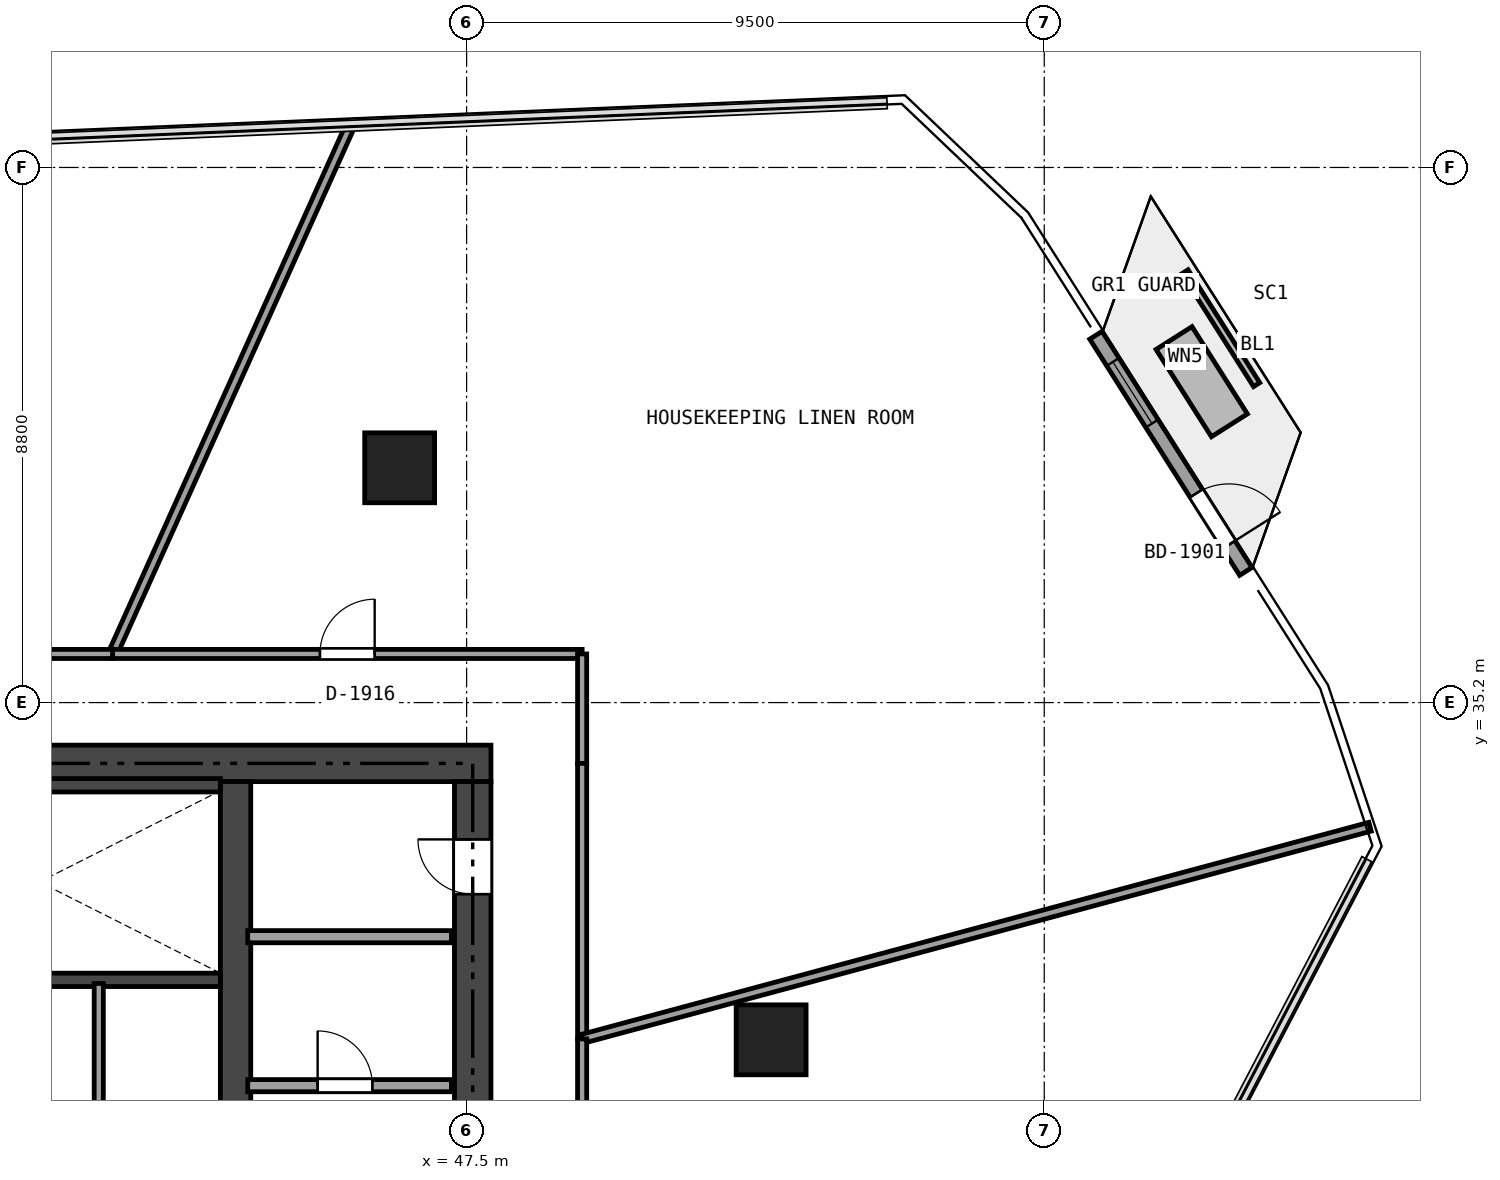
"""IFC4 building model, lengths in metres.
Left out: names, types, materials, properties, quantities, classifications, styles, units other than length and angle.
Written with IfcOpenShell. Run it as: python <this file> out.ifc"""

import sys

from ifc_helpers import new_model, si_unit, direction, frame, frame_2d, origin, origin_2d, place, context, subcontext, project, spatial, rectangle, extrude, element, fill, save


model = new_model("IFC4")
c1 = context("Model", 3, precision=1e-05, world=origin(), true_north=direction((0.0, 1.0)))
c2 = subcontext(c1, "Body", "Model", "MODEL_VIEW")
j1 = project(units=[si_unit("LENGTHUNIT", "METRE"), si_unit("PLANEANGLEUNIT", "RADIAN")], contexts=[c1])
p1 = place(None, origin())
s1 = spatial("IfcSite", under=j1, at=p1, CompositionType="ELEMENT")
p2 = place(p1, origin())
s2 = spatial("IfcBuilding", under=s1, at=p2, CompositionType="ELEMENT")
p3 = place(p2, frame((0.0, 0.0, 76.35)))
s3 = spatial("IfcBuildingStorey", under=s2, at=p3, CompositionType="ELEMENT", Elevation=76.35)
p4 = place(p3, frame((26.5, 34.2, 0.0), z_axis=(0.0, 0.0, 1.0), x_axis=(1.0, 0.0, 0.0)))
e1 = element("IfcWall", 1, at=p4, inside=s3, PredefinedType="SHEAR", context=c2, shape_type="SweptSolid", body=[
    extrude(rectangle(XDim=21.4, YDim=0.6, at=frame_2d((10.7, 0.0))), origin(), (0.0, 0.0, 1.0), 3.17),
])
p5 = place(p4, frame((9.7, 0.0, 0.0)))
e2 = element("IfcOpeningElement", 2, at=p5, cuts=e1, PredefinedType="OPENING", context=c2, shape_type="SweptSolid", body=[
    extrude(rectangle(XDim=1.1, YDim=2.15, at=frame_2d((0.55, 1.075))), frame((0.0, 0.31, 0.0), z_axis=(0.0, -1.0, 0.0), x_axis=(1.0, 0.0, 0.0)), (0.0, 0.0, 1.0), 0.62),
])
p6 = place(p4, frame((1.95, 0.0, 0.0)))
e3 = element("IfcOpeningElement", 3, at=p6, cuts=e1, PredefinedType="OPENING", context=c2, shape_type="SweptSolid", body=[
    extrude(rectangle(XDim=0.9, YDim=2.1, at=frame_2d((0.45, 1.05))), frame((0.0, 0.31, 0.0), z_axis=(0.0, -1.0, 0.0), x_axis=(1.0, 0.0, 0.0)), (0.0, 0.0, 1.0), 0.62),
])
p7 = place(p4, frame((6.25, 0.0, 0.0)))
e4 = element("IfcOpeningElement", 4, at=p7, cuts=e1, PredefinedType="OPENING", context=c2, shape_type="SweptSolid", body=[
    extrude(rectangle(XDim=0.9, YDim=2.1, at=frame_2d((0.45, 1.05))), frame((0.0, 0.31, 0.0), z_axis=(0.0, -1.0, 0.0), x_axis=(1.0, 0.0, 0.0)), (0.0, 0.0, 1.0), 0.62),
])
p8 = place(p3, frame((47.6, 18.9, 0.0), z_axis=(0.0, 0.0, 1.0), x_axis=(0.0, 1.0, 0.0)))
e5 = element("IfcWall", 5, at=p8, inside=s3, PredefinedType="SHEAR", context=c2, shape_type="SweptSolid", body=[
    extrude(rectangle(XDim=15.0, YDim=0.6, at=frame_2d((7.5, 0.0))), origin(), (0.0, 0.0, 1.0), 3.17),
])
p9 = place(p8, frame((6.6, 0.0, 0.0)))
e6 = element("IfcOpeningElement", 6, at=p9, cuts=e5, PredefinedType="OPENING", context=c2, shape_type="SweptSolid", body=[
    extrude(rectangle(XDim=1.1, YDim=2.15, at=frame_2d((0.55, 1.075))), frame((0.0, 0.31, 0.0), z_axis=(0.0, -1.0, 0.0), x_axis=(1.0, 0.0, 0.0)), (0.0, 0.0, 1.0), 0.62),
])
p10 = place(p8, frame((8.5, 0.0, 0.0)))
e7 = element("IfcOpeningElement", 7, at=p10, cuts=e5, PredefinedType="OPENING", context=c2, shape_type="SweptSolid", body=[
    extrude(rectangle(XDim=0.9, YDim=2.1, at=frame_2d((0.45, 1.05))), frame((0.0, 0.31, 0.0), z_axis=(0.0, -1.0, 0.0), x_axis=(1.0, 0.0, 0.0)), (0.0, 0.0, 1.0), 0.62),
])
p11 = place(p8, frame((13.15, 0.0, 0.0)))
e8 = element("IfcOpeningElement", 8, at=p11, cuts=e5, PredefinedType="OPENING", context=c2, shape_type="SweptSolid", body=[
    extrude(rectangle(XDim=0.9, YDim=2.1, at=frame_2d((0.45, 1.05))), frame((0.0, 0.31, 0.0), z_axis=(0.0, -1.0, 0.0), x_axis=(1.0, 0.0, 0.0)), (0.0, 0.0, 1.0), 0.62),
])
p12 = place(p3, frame((43.7, 18.9, 0.0), z_axis=(0.0, 0.0, 1.0), x_axis=(0.0, 1.0, 0.0)))
e9 = element("IfcWall", 9, at=p12, inside=s3, PredefinedType="SHEAR", context=c2, shape_type="SweptSolid", body=[
    extrude(rectangle(XDim=15.0, YDim=0.5, at=frame_2d((7.5, 0.0))), origin(), (0.0, 0.0, 1.0), 3.17),
])
p13 = place(p12, frame((8.1, 0.0, 0.0)))
e10 = element("IfcOpeningElement", 10, at=p13, cuts=e9, PredefinedType="OPENING", context=c2, shape_type="SweptSolid", body=[
    extrude(rectangle(XDim=0.9, YDim=2.1, at=frame_2d((0.45, 1.05))), frame((0.0, 0.26, 0.0), z_axis=(0.0, -1.0, 0.0), x_axis=(1.0, 0.0, 0.0)), (0.0, 0.0, 1.0), 0.52),
])
p14 = place(p3, frame((35.84, 30.64, 0.0), z_axis=(0.0, 0.0, 1.0), x_axis=(1.0, 0.0, 0.0)))
e11 = element("IfcWall", 11, at=p14, inside=s3, PredefinedType="SHEAR", context=c2, shape_type="SweptSolid", body=[
    extrude(rectangle(XDim=7.61, YDim=0.22, at=frame_2d((3.805, 0.0))), origin(), (0.0, 0.0, 1.0), 3.17),
])
p15 = place(p3, frame((37.55, 33.84, 0.0), z_axis=(0.0, 0.0, 1.0), x_axis=(1.0, 0.0, 0.0)))
e12 = element("IfcWall", 12, at=p15, inside=s3, PredefinedType="SHEAR", context=c2, shape_type="SweptSolid", body=[
    extrude(rectangle(XDim=5.9, YDim=0.22, at=frame_2d((2.95, 0.0))), origin(), (0.0, 0.0, 1.0), 3.17),
])
for number, where, z_axis, x_axis in (
    (13, (52.508, 29.654, -0.405), (0.0, 0.0, 1.0), (1.0, 0.0, 0.0)),
    (14, (46.399, 39.061, -0.405), (0.0, 0.0, 1.0), (1.0, 0.0, 0.0)),
):
    element("IfcColumn", number, at=place(p3, frame(where, z_axis=z_axis, x_axis=x_axis)), inside=s3, PredefinedType="COLUMN", context=c2, shape_type="SweptSolid", body=[
        extrude(rectangle(XDim=1.15, YDim=1.15, at=origin_2d()), origin(), (0.0, 0.0, 1.0), 3.575),
    ])
p16 = place(p3, frame((57.85, 41.241, 0.0), z_axis=(0.0, 0.0, 1.0), x_axis=(0.535820801743, -0.844331728895, 0.0)))
e15 = element("IfcWall", 15, at=p16, inside=s3, PredefinedType="SOLIDWALL", context=c2, shape_type="SweptSolid", body=[
    extrude(rectangle(XDim=4.6, YDim=0.24, at=frame_2d((2.3, 0.0))), origin(), (0.0, 0.0, 1.0), 3.17),
])
p17 = place(p16, frame((3.08, 0.0, 0.0)))
e16 = element("IfcOpeningElement", 16, at=p17, cuts=e15, PredefinedType="OPENING", context=c2, shape_type="SweptSolid", body=[
    extrude(rectangle(XDim=1.0, YDim=2.15, at=frame_2d((0.5, 1.075))), frame((0.0, 0.13, 0.0), z_axis=(0.0, -1.0, 0.0), x_axis=(1.0, 0.0, 0.0)), (0.0, 0.0, 1.0), 0.26),
])
p18 = place(p16, frame((0.52, 0.0, 0.2)))
e17 = element("IfcOpeningElement", 17, at=p18, cuts=e15, PredefinedType="OPENING", context=c2, shape_type="SweptSolid", body=[
    extrude(rectangle(XDim=1.2, YDim=1.8, at=frame_2d((0.6, 0.9))), frame((0.0, 0.13, 0.0), z_axis=(0.0, -1.0, 0.0), x_axis=(1.0, 0.0, 0.0)), (0.0, 0.0, 1.0), 0.26),
])
p19 = place(p3, frame((43.9, 28.9, 0.0), z_axis=(0.0, 0.0, 1.0), x_axis=(1.0, 0.0, 0.0)))
e18 = element("IfcWall", 18, at=p19, inside=s3, PredefinedType="SOLIDWALL", context=c2, shape_type="SweptSolid", body=[
    extrude(rectangle(XDim=3.35, YDim=0.2, at=frame_2d((1.675, 0.0))), origin(), (0.0, 0.0, 1.0), 3.17),
])
p20 = place(p19, frame((1.15, 0.0, 0.0)))
e19 = element("IfcOpeningElement", 19, at=p20, cuts=e18, PredefinedType="OPENING", context=c2, shape_type="SweptSolid", body=[
    extrude(rectangle(XDim=0.9, YDim=2.1, at=frame_2d((0.45, 1.05))), frame((0.0, 0.11, 0.0), z_axis=(0.0, -1.0, 0.0), x_axis=(1.0, 0.0, 0.0)), (0.0, 0.0, 1.0), 0.22),
])
p21 = place(p3, frame((43.9, 31.35, 0.0), z_axis=(0.0, 0.0, 1.0), x_axis=(1.0, 0.0, 0.0)))
e20 = element("IfcWall", 20, at=p21, inside=s3, PredefinedType="SOLIDWALL", context=c2, shape_type="SweptSolid", body=[
    extrude(rectangle(XDim=3.35, YDim=0.2, at=frame_2d((1.675, 0.0))), origin(), (0.0, 0.0, 1.0), 3.17),
])
p22 = place(p3, frame((41.45, 28.15, 0.0), z_axis=(0.0, 0.0, 1.0), x_axis=(0.0, 1.0, 0.0)))
e21 = element("IfcWall", 21, at=p22, inside=s3, PredefinedType="PARTITIONING", context=c2, shape_type="SweptSolid", body=[
    extrude(rectangle(XDim=2.43, YDim=0.15, at=frame_2d((1.215, 0.0))), origin(), (0.0, 0.0, 1.0), 3.17),
])
p23 = place(p3, frame((45.608, 44.735, 0.0), z_axis=(0.0, 0.0, 1.0), x_axis=(-0.410374215248, -0.911917213052, 0.0)))
e22 = element("IfcWall", 22, at=p23, inside=s3, PredefinedType="PARTITIONING", context=c2, shape_type="SweptSolid", body=[
    extrude(rectangle(XDim=9.579, YDim=0.15, at=frame_2d((4.79, 0.0))), origin(), (0.0, 0.0, 1.0), 2.455),
])
p24 = place(p3, frame((41.677, 36.0, 0.0), z_axis=(0.0, 0.0, 1.0), x_axis=(1.0, 0.0, 0.0)))
e23 = element("IfcWall", 23, at=p24, inside=s3, PredefinedType="PARTITIONING", context=c2, shape_type="SweptSolid", body=[
    extrude(rectangle(XDim=7.723, YDim=0.15, at=frame_2d((3.861, 0.0))), origin(), (0.0, 0.0, 1.0), 2.455),
])
p25 = place(p24, frame((3.411, 0.0, 0.0)))
e24 = element("IfcOpeningElement", 24, at=p25, cuts=e23, PredefinedType="OPENING", context=c2, shape_type="SweptSolid", body=[
    extrude(rectangle(XDim=0.9, YDim=2.0, at=frame_2d((0.45, 1.0))), frame((0.0, 0.085, 0.0), z_axis=(0.0, -1.0, 0.0), x_axis=(1.0, 0.0, 0.0)), (0.0, 0.0, 1.0), 0.17),
])
p26 = place(p3, frame((49.4, 36.0, 0.0), z_axis=(0.0, 0.0, 1.0), x_axis=(0.0, -1.0, 0.0)))
e25 = element("IfcWall", 25, at=p26, inside=s3, PredefinedType="PARTITIONING", context=c2, shape_type="SweptSolid", body=[
    extrude(rectangle(XDim=1.8, YDim=0.15, at=frame_2d((0.9, 0.0))), origin(), (0.0, 0.0, 1.0), 2.455),
])
p27 = place(p3, frame((49.4, 34.2, 0.0), z_axis=(0.0, 0.0, 1.0), x_axis=(0.0, -1.0, 0.0)))
e26 = element("IfcWall", 26, at=p27, inside=s3, PredefinedType="PARTITIONING", context=c2, shape_type="SweptSolid", body=[
    extrude(rectangle(XDim=4.531, YDim=0.15, at=frame_2d((2.266, 0.0))), origin(), (0.0, 0.0, 1.0), 2.455),
])
p28 = place(p3, frame((49.4, 29.669, 0.0), z_axis=(0.0, 0.0, 1.0), x_axis=(0.965609785955, 0.259995656249, 0.0)))
e27 = element("IfcWall", 27, at=p28, inside=s3, PredefinedType="PARTITIONING", context=c2, shape_type="SweptSolid", body=[
    extrude(rectangle(XDim=13.419, YDim=0.15, at=frame_2d((6.71, 0.0))), origin(), (0.0, 0.0, 1.0), 2.455),
])
p29 = place(p3, frame((32.723, 36.0, 0.0), z_axis=(0.0, 0.0, 1.0), x_axis=(1.0, 0.0, 0.0)))
e28 = element("IfcWall", 28, at=p29, inside=s3, PredefinedType="PARTITIONING", context=c2, shape_type="SweptSolid", body=[
    extrude(rectangle(XDim=8.954, YDim=0.15, at=frame_2d((4.477, 0.0))), origin(), (0.0, 0.0, 1.0), 2.467),
])
p30 = place(p29, frame((4.002, 0.0, 0.0)))
e29 = element("IfcOpeningElement", 29, at=p30, cuts=e28, PredefinedType="OPENING", context=c2, shape_type="SweptSolid", body=[
    extrude(rectangle(XDim=0.95, YDim=2.15, at=frame_2d((0.475, 1.075))), frame((0.0, 0.085, 0.0), z_axis=(0.0, -1.0, 0.0), x_axis=(1.0, 0.0, 0.0)), (0.0, 0.0, 1.0), 0.17),
])
p31 = place(p3, frame((49.4, 29.669, 0.0), z_axis=(0.0, 0.0, 1.0), x_axis=(0.0, -1.0, 0.0)))
e30 = element("IfcWall", 30, at=p31, inside=s3, PredefinedType="PARTITIONING", context=c2, shape_type="SweptSolid", body=[
    extrude(rectangle(XDim=11.069, YDim=0.15, at=frame_2d((5.534, 0.0))), origin(), (0.0, 0.0, 1.0), 2.455),
])
p32 = place(p31, frame((5.06, 0.0, 0.0)))
e31 = element("IfcOpeningElement", 31, at=p32, cuts=e30, PredefinedType="OPENING", context=c2, shape_type="SweptSolid", body=[
    extrude(rectangle(XDim=0.95, YDim=2.15, at=frame_2d((0.475, 1.075))), frame((0.0, 0.085, 0.0), z_axis=(0.0, -1.0, 0.0), x_axis=(1.0, 0.0, 0.0)), (0.0, 0.0, 1.0), 0.17),
])
p33 = place(p17, origin())
e32 = element("IfcDoor", 32, at=p33, inside=s3, OperationType="SINGLE_SWING_RIGHT", PredefinedType="DOOR", context=c2, shape_type="SweptSolid", body=[
    extrude(rectangle(XDim=1.0, YDim=2.15, at=frame_2d((0.5, 1.075))), frame((0.0, 0.025, 0.0), z_axis=(0.0, -1.0, 0.0), x_axis=(1.0, 0.0, 0.0)), (0.0, 0.0, 1.0), 0.05),
])
fill(e16, e32)
p34 = place(p18, origin())
e33 = element("IfcWindow", 33, at=p34, inside=s3, PartitioningType="SINGLE_PANEL", PredefinedType="WINDOW", context=c2, shape_type="SweptSolid", body=[
    extrude(rectangle(XDim=1.2, YDim=1.8, at=frame_2d((0.6, 0.9))), frame((0.0, 0.03, 0.0), z_axis=(0.0, -1.0, 0.0), x_axis=(1.0, 0.0, 0.0)), (0.0, 0.0, 1.0), 0.06),
])
fill(e17, e33)
p35 = place(p20, origin())
e34 = element("IfcDoor", 34, at=p35, inside=s3, OperationType="SINGLE_SWING_LEFT", PredefinedType="DOOR", context=c2, shape_type="SweptSolid", body=[
    extrude(rectangle(XDim=0.9, YDim=2.1, at=frame_2d((0.45, 1.05))), frame((0.0, 0.025, 0.0), z_axis=(0.0, -1.0, 0.0), x_axis=(1.0, 0.0, 0.0)), (0.0, 0.0, 1.0), 0.05),
])
fill(e19, e34)
p36 = place(p11, origin())
e35 = element("IfcDoor", 35, at=p36, inside=s3, OperationType="SINGLE_SWING_RIGHT", PredefinedType="DOOR", context=c2, shape_type="SweptSolid", body=[
    extrude(rectangle(XDim=0.9, YDim=2.1, at=frame_2d((0.45, 1.05))), frame((0.0, 0.025, 0.0), z_axis=(0.0, -1.0, 0.0), x_axis=(1.0, 0.0, 0.0)), (0.0, 0.0, 1.0), 0.05),
])
fill(e8, e35)
p37 = place(p25, origin())
e36 = element("IfcDoor", 36, at=p37, inside=s3, OperationType="SINGLE_SWING_RIGHT", PredefinedType="DOOR", context=c2, shape_type="SweptSolid", body=[
    extrude(rectangle(XDim=0.9, YDim=2.0, at=frame_2d((0.45, 1.0))), frame((0.0, 0.025, 0.0), z_axis=(0.0, -1.0, 0.0), x_axis=(1.0, 0.0, 0.0)), (0.0, 0.0, 1.0), 0.05),
])
fill(e24, e36)
save(model, sys.argv[1])
